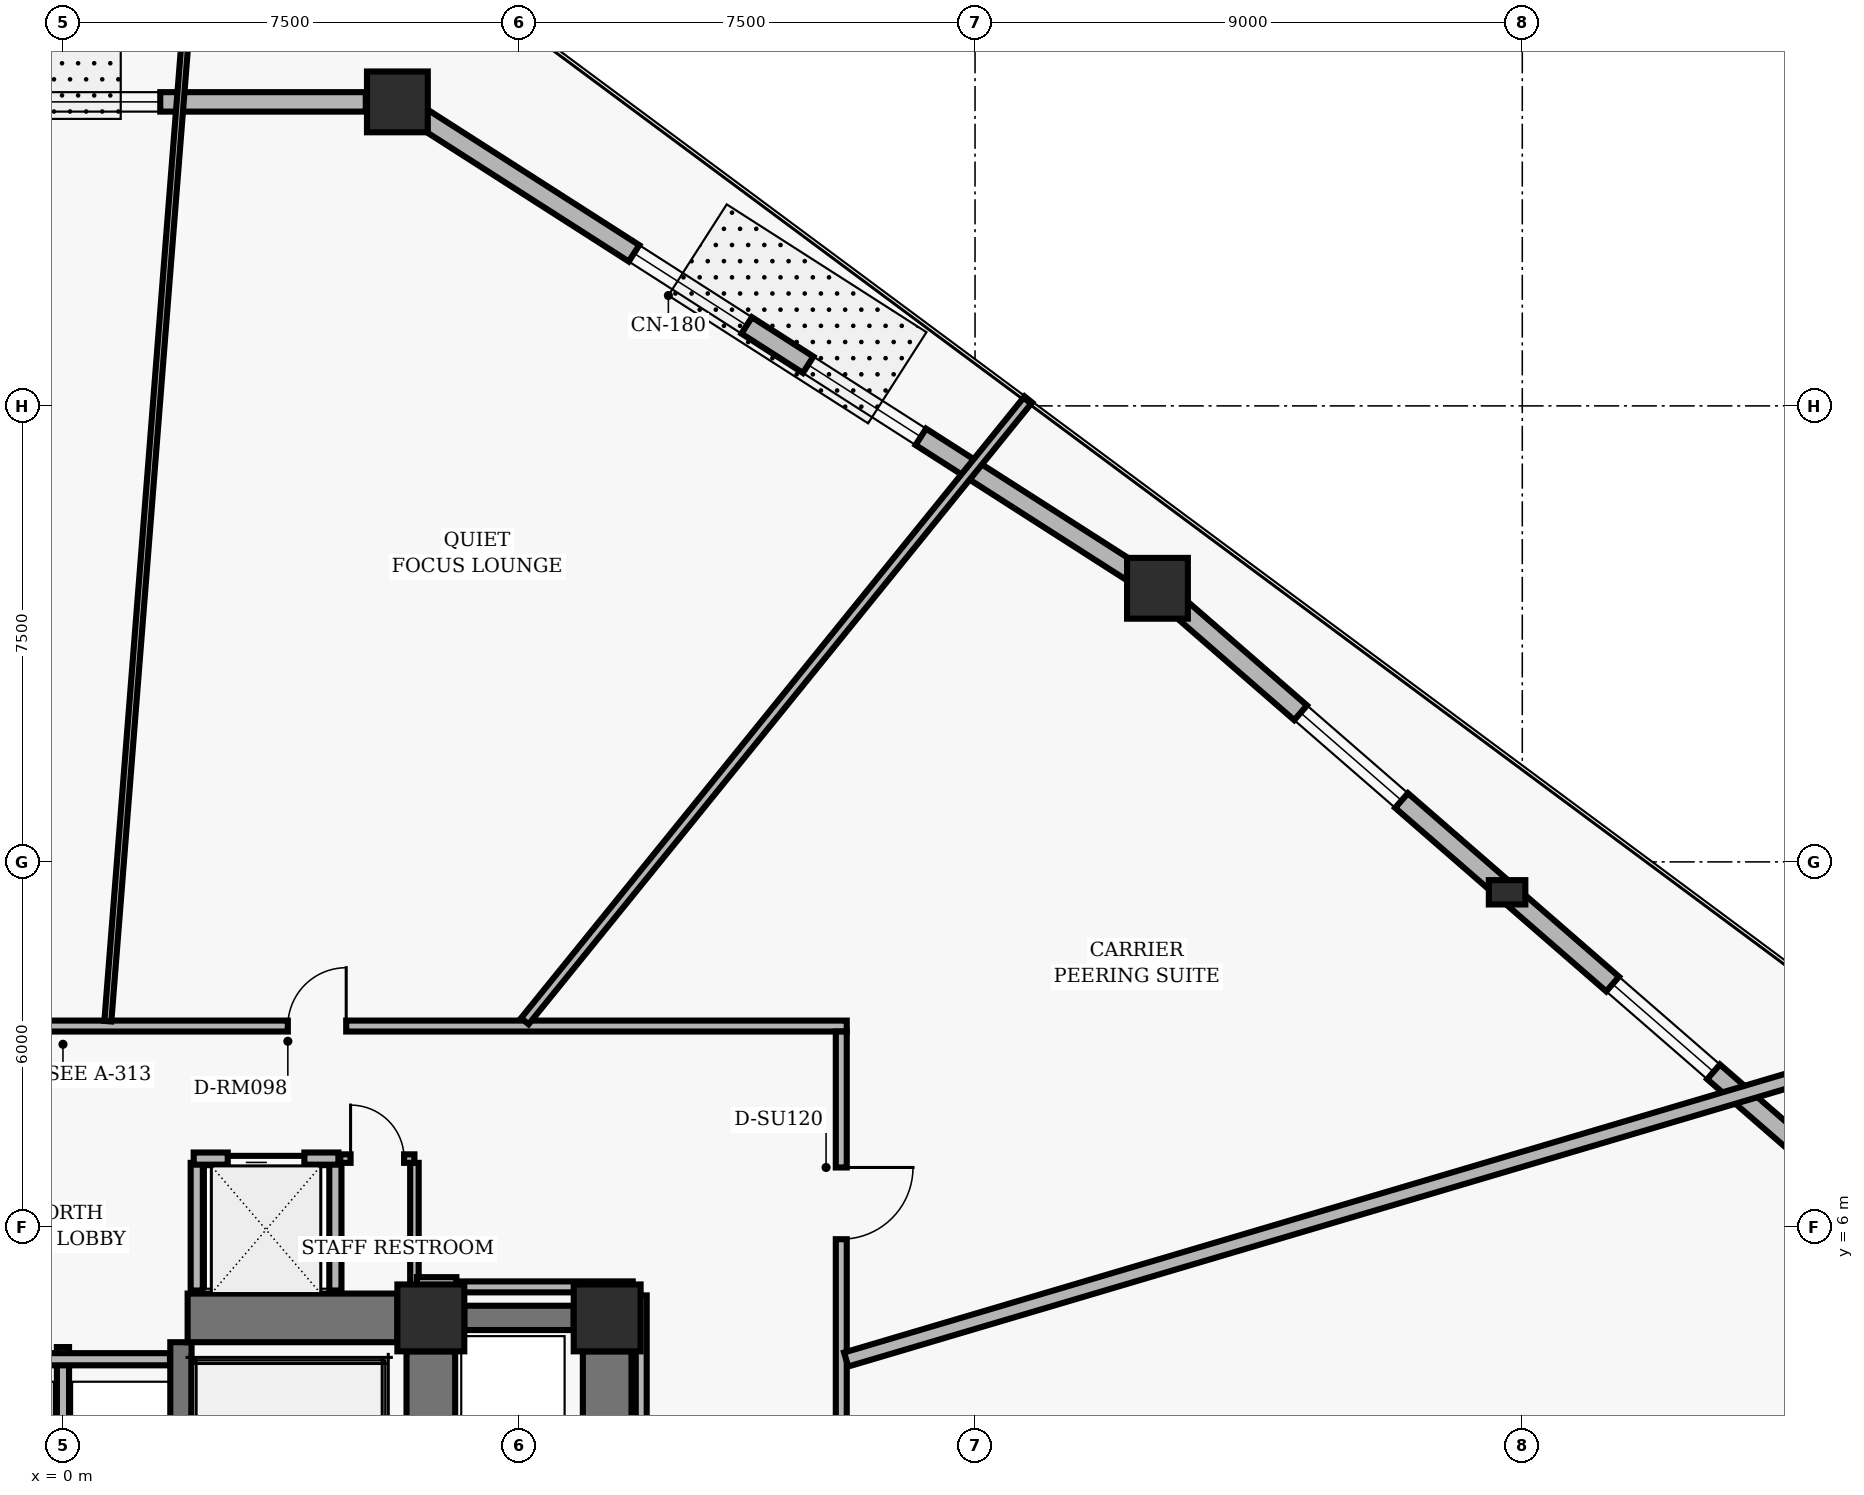
"""IFC4 building model, lengths in metres.
Left out: names, types, materials, properties, quantities, classifications, styles, units other than length and angle.
Written with IfcOpenShell. Run it as: python <this file> out.ifc"""

import sys

from ifc_helpers import new_model, si_unit, direction, frame, frame_2d, origin, origin_2d, place, context, subcontext, project, spatial, rectangle, hollow_rectangle, extrude, element, fill, save


model = new_model("IFC4")
c1 = context("Model", 3, precision=1e-05, world=origin(), true_north=direction((0.0, 1.0)))
c2 = subcontext(c1, "Body", "Model", "MODEL_VIEW")
j1 = project(units=[si_unit("LENGTHUNIT", "METRE"), si_unit("PLANEANGLEUNIT", "RADIAN")], contexts=[c1])
p1 = place(None, origin())
s1 = spatial("IfcSite", under=j1, at=p1, CompositionType="ELEMENT")
p2 = place(p1, origin())
s2 = spatial("IfcBuilding", under=s1, at=p2, CompositionType="ELEMENT")
p3 = place(p2, frame((0.0, 0.0, 4.8)))
s3 = spatial("IfcBuildingStorey", under=s2, at=p3, CompositionType="ELEMENT", Elevation=4.8)
for number, where, z_axis, x_axis in (
    (1, (6.05, 4.5, 0.0), (0.0, 0.0, 1.0), (1.0, 0.0, 0.0)),
    (2, (8.95, 4.5, 0.0), (0.0, 0.0, 1.0), (1.0, 0.0, 0.0)),
):
    element("IfcColumn", number, at=place(p3, frame(where, z_axis=z_axis, x_axis=x_axis)), inside=s3, PredefinedType="COLUMN", context=c2, shape_type="SweptSolid", body=[
        extrude(hollow_rectangle(XDim=1.1, YDim=1.1, WallThickness=0.07, InnerFilletRadius=0.02, OuterFilletRadius=0.04, at=origin_2d()), origin(), (0.0, 0.0, 1.0), 3.52),
    ])
p4 = place(p3, frame((6.05, 0.55, 0.0), z_axis=(0.0, 0.0, 1.0), x_axis=(0.0, 1.0, 0.0)))
e3 = element("IfcWall", 3, at=p4, inside=s3, PredefinedType="SHEAR", context=c2, shape_type="SweptSolid", body=[
    extrude(rectangle(XDim=3.4, YDim=0.8, at=frame_2d((1.7, 0.0))), origin(), (0.0, 0.0, 1.0), 3.218),
])
p5 = place(p3, frame((1.94, -4.1, 0.0), z_axis=(0.0, 0.0, 1.0), x_axis=(0.0, 1.0, 0.0)))
e4 = element("IfcWall", 4, at=p5, inside=s3, PredefinedType="SHEAR", context=c2, shape_type="SweptSolid", body=[
    extrude(rectangle(XDim=8.2, YDim=0.35, at=frame_2d((4.1, 0.0))), origin(), (0.0, 0.0, 1.0), 3.218),
])
p6 = place(p3, frame((2.05, 4.5, 0.0), z_axis=(0.0, 0.0, 1.0), x_axis=(1.0, 0.0, 0.0)))
e5 = element("IfcWall", 5, at=p6, inside=s3, PredefinedType="SHEAR", context=c2, shape_type="SweptSolid", body=[
    extrude(rectangle(XDim=3.45, YDim=0.8, at=frame_2d((1.725, 0.0))), origin(), (0.0, 0.0, 1.0), 3.218),
])
p7 = place(p3, frame((8.95, -3.75, 0.0), z_axis=(0.0, 0.0, 1.0), x_axis=(0.0, 1.0, 0.0)))
e6 = element("IfcWall", 6, at=p7, inside=s3, PredefinedType="SHEAR", context=c2, shape_type="SweptSolid", body=[
    extrude(rectangle(XDim=7.7, YDim=0.8, at=frame_2d((3.85, 0.0))), origin(), (0.0, 0.0, 1.0), 3.218),
])
p8 = place(p3, frame((6.6, 4.5, 0.0), z_axis=(0.0, 0.0, 1.0), x_axis=(1.0, 0.0, 0.0)))
e7 = element("IfcWall", 7, at=p8, inside=s3, PredefinedType="SHEAR", context=c2, shape_type="SweptSolid", body=[
    extrude(rectangle(XDim=1.8, YDim=0.4, at=frame_2d((0.9, 0.0))), origin(), (0.0, 0.0, 1.0), 3.218),
])
for number, where, z_axis, x_axis in (
    (8, (18.0, 16.5, 0.0), (0.0, 0.0, 1.0), (1.0, 0.0, 0.0)),
    (9, (5.5, 24.5, 0.0), (0.0, 0.0, 1.0), (1.0, 0.0, 0.0)),
):
    element("IfcColumn", number, at=place(p3, frame(where, z_axis=z_axis, x_axis=x_axis)), inside=s3, PredefinedType="COLUMN", context=c2, shape_type="SweptSolid", body=[
        extrude(rectangle(XDim=1.0, YDim=1.0, at=origin_2d()), origin(), (0.0, 0.0, 1.0), 3.52),
    ])
p9 = place(p3, frame((23.75, 11.5, 0.0), z_axis=(0.0, 0.0, 1.0), x_axis=(1.0, 0.0, 0.0)))
e10 = element("IfcColumn", 10, at=p9, inside=s3, PredefinedType="PILASTER", context=c2, shape_type="SweptSolid", body=[
    extrude(rectangle(XDim=0.6, YDim=0.4, at=origin_2d()), origin(), (0.0, 0.0, 1.0), 3.52),
])
p10 = place(p3, frame((18.392, 16.159, 0.0), z_axis=(0.0, 0.0, 1.0), x_axis=(0.754615886195, -0.656166796098, 0.0)))
e11 = element("IfcWall", 11, at=p10, inside=s3, PredefinedType="SOLIDWALL", context=c2, shape_type="SweptSolid", body=[
    extrude(rectangle(XDim=14.2, YDim=0.32, at=frame_2d((7.1, 0.0))), origin(), (0.0, 0.0, 1.0), 2.261),
])
p11 = place(p10, frame((2.6, 0.0, 0.4)))
e12 = element("IfcOpeningElement", 12, at=p11, cuts=e11, PredefinedType="OPENING", context=c2, shape_type="SweptSolid", body=[
    extrude(rectangle(XDim=2.2, YDim=1.1, at=frame_2d((1.1, 0.55))), frame((0.0, 0.17, 0.0), z_axis=(0.0, -1.0, 0.0), x_axis=(1.0, 0.0, 0.0)), (0.0, 0.0, 1.0), 0.34),
])
p12 = place(p10, frame((9.4, 0.0, 0.4)))
e13 = element("IfcOpeningElement", 13, at=p12, cuts=e11, PredefinedType="OPENING", context=c2, shape_type="SweptSolid", body=[
    extrude(rectangle(XDim=2.2, YDim=1.1, at=frame_2d((1.1, 0.55))), frame((0.0, 0.17, 0.0), z_axis=(0.0, -1.0, 0.0), x_axis=(1.0, 0.0, 0.0)), (0.0, 0.0, 1.0), 0.34),
])
p13 = place(p3, frame((5.938, 24.22, 0.0), z_axis=(0.0, 0.0, 1.0), x_axis=(0.842268830443, -0.539057712368, 0.0)))
e14 = element("IfcWall", 14, at=p13, inside=s3, PredefinedType="SOLIDWALL", context=c2, shape_type="SweptSolid", body=[
    extrude(rectangle(XDim=13.801, YDim=0.32, at=frame_2d((6.9, 0.0))), origin(), (0.0, 0.0, 1.0), 2.588),
])
p14 = place(p13, frame((4.1, 0.0, 0.65)))
e15 = element("IfcOpeningElement", 15, at=p14, cuts=e14, PredefinedType="OPENING", context=c2, shape_type="SweptSolid", body=[
    extrude(rectangle(XDim=2.2, YDim=1.1, at=frame_2d((1.1, 0.55))), frame((0.0, 0.17, 0.0), z_axis=(0.0, -1.0, 0.0), x_axis=(1.0, 0.0, 0.0)), (0.0, 0.0, 1.0), 0.34),
])
p15 = place(p13, frame((7.5, 0.0, 0.65)))
e16 = element("IfcOpeningElement", 16, at=p15, cuts=e14, PredefinedType="OPENING", context=c2, shape_type="SweptSolid", body=[
    extrude(rectangle(XDim=2.2, YDim=1.1, at=frame_2d((1.1, 0.55))), frame((0.0, 0.17, 0.0), z_axis=(0.0, -1.0, 0.0), x_axis=(1.0, 0.0, 0.0)), (0.0, 0.0, 1.0), 0.34),
])
p16 = place(p3, frame((-6.98, 24.5, 0.0), z_axis=(0.0, 0.0, 1.0), x_axis=(1.0, 0.0, 0.0)))
e17 = element("IfcWall", 17, at=p16, inside=s3, PredefinedType="SOLIDWALL", context=c2, shape_type="SweptSolid", body=[
    extrude(rectangle(XDim=11.96, YDim=0.32, at=frame_2d((5.98, 0.0))), origin(), (0.0, 0.0, 1.0), 2.588),
])
p17 = place(p16, frame((3.38, 0.0, 0.65)))
e18 = element("IfcOpeningElement", 18, at=p17, cuts=e17, PredefinedType="OPENING", context=c2, shape_type="SweptSolid", body=[
    extrude(rectangle(XDim=2.0, YDim=1.6, at=frame_2d((1.0, 0.8))), frame((0.0, 0.17, 0.0), z_axis=(0.0, -1.0, 0.0), x_axis=(1.0, 0.0, 0.0)), (0.0, 0.0, 1.0), 0.34),
])
p18 = place(p16, frame((6.58, 0.0, 0.65)))
e19 = element("IfcOpeningElement", 19, at=p18, cuts=e17, PredefinedType="OPENING", context=c2, shape_type="SweptSolid", body=[
    extrude(rectangle(XDim=2.0, YDim=1.6, at=frame_2d((1.0, 0.8))), frame((0.0, 0.17, 0.0), z_axis=(0.0, -1.0, 0.0), x_axis=(1.0, 0.0, 0.0)), (0.0, 0.0, 1.0), 0.34),
])
p19 = place(p3, frame((0.0, 1.25, 0.0), z_axis=(0.0, 0.0, 1.0), x_axis=(0.0, 1.0, 0.0)))
e20 = element("IfcWall", 20, at=p19, inside=s3, PredefinedType="PARTITIONING", context=c2, shape_type="SweptSolid", body=[
    extrude(rectangle(XDim=2.77, YDim=0.2, at=frame_2d((1.385, 0.0))), origin(), (0.0, 0.0, 1.0), 3.193),
])
p20 = place(p3, frame((-1.76, 3.82, 0.0), z_axis=(0.0, 0.0, 1.0), x_axis=(1.0, 0.0, 0.0)))
e21 = element("IfcWall", 21, at=p20, inside=s3, PredefinedType="PARTITIONING", context=c2, shape_type="SweptSolid", body=[
    extrude(rectangle(XDim=3.52, YDim=0.2, at=frame_2d((1.76, 0.0))), origin(), (0.0, 0.0, 1.0), 3.193),
])
for number, where, z_axis, x_axis in (
    (22, (2.2, 4.95, 0.0), (0.0, 0.0, 1.0), (0.0, 1.0, 0.0)),
    (23, (4.48, 4.95, 0.0), (0.0, 0.0, 1.0), (0.0, 1.0, 0.0)),
):
    element("IfcWall", number, at=place(p3, frame(where, z_axis=z_axis, x_axis=x_axis)), inside=s3, PredefinedType="PARTITIONING", context=c2, shape_type="SweptSolid", body=[
        extrude(rectangle(XDim=2.1, YDim=0.2, at=frame_2d((1.05, 0.0))), origin(), (0.0, 0.0, 1.0), 3.193),
    ])
p21 = place(p3, frame((2.15, 7.12, 0.0), z_axis=(0.0, 0.0, 1.0), x_axis=(1.0, 0.0, 0.0)))
e24 = element("IfcWall", 24, at=p21, inside=s3, PredefinedType="PARTITIONING", context=c2, shape_type="SweptSolid", body=[
    extrude(rectangle(XDim=2.38, YDim=0.2, at=frame_2d((1.19, 0.0))), origin(), (0.0, 0.0, 1.0), 3.193),
])
p22 = place(p21, frame((0.56, 0.0, 0.0)))
e25 = element("IfcOpeningElement", 25, at=p22, cuts=e24, PredefinedType="OPENING", context=c2, shape_type="SweptSolid", body=[
    extrude(rectangle(XDim=1.26, YDim=2.06, at=frame_2d((0.63, 1.03))), frame((0.0, 0.11, 0.0), z_axis=(0.0, -1.0, 0.0), x_axis=(1.0, 0.0, 0.0)), (0.0, 0.0, 1.0), 0.22),
])
p23 = place(p3, frame((5.78, 4.95, 0.0), z_axis=(0.0, 0.0, 1.0), x_axis=(0.0, 1.0, 0.0)))
e26 = element("IfcWall", 26, at=p23, inside=s3, PredefinedType="PARTITIONING", context=c2, shape_type="SweptSolid", body=[
    extrude(rectangle(XDim=2.1, YDim=0.14, at=frame_2d((1.05, 0.0))), origin(), (0.0, 0.0, 1.0), 2.246),
])
p24 = place(p3, frame((4.56, 7.12, 0.0), z_axis=(0.0, 0.0, 1.0), x_axis=(1.0, 0.0, 0.0)))
e27 = element("IfcWall", 27, at=p24, inside=s3, PredefinedType="PARTITIONING", context=c2, shape_type="SweptSolid", body=[
    extrude(rectangle(XDim=1.22, YDim=0.14, at=frame_2d((0.61, 0.0))), origin(), (0.0, 0.0, 1.0), 3.193),
])
p25 = place(p24, frame((0.17, 0.0, 0.0)))
e28 = element("IfcOpeningElement", 28, at=p25, cuts=e27, PredefinedType="OPENING", context=c2, shape_type="SweptSolid", body=[
    extrude(rectangle(XDim=0.88, YDim=2.02, at=frame_2d((0.44, 1.01))), frame((0.0, 0.08, 0.0), z_axis=(0.0, -1.0, 0.0), x_axis=(1.0, 0.0, 0.0)), (0.0, 0.0, 1.0), 0.16),
])
p26 = place(p3, frame((-12.89, 9.3, 0.0), z_axis=(0.0, 0.0, 1.0), x_axis=(1.0, 0.0, 0.0)))
e29 = element("IfcWall", 29, at=p26, inside=s3, PredefinedType="PARTITIONING", context=c2, shape_type="SweptSolid", body=[
    extrude(rectangle(XDim=25.78, YDim=0.18, at=frame_2d((12.89, 0.0))), origin(), (0.0, 0.0, 1.0), 2.76),
])
p27 = place(p26, frame((16.588, 0.0, 0.0)))
e30 = element("IfcOpeningElement", 30, at=p27, cuts=e29, PredefinedType="OPENING", context=c2, shape_type="SweptSolid", body=[
    extrude(rectangle(XDim=0.96, YDim=2.02, at=frame_2d((0.48, 1.01))), frame((0.0, 0.1, 0.0), z_axis=(0.0, -1.0, 0.0), x_axis=(1.0, 0.0, 0.0)), (0.0, 0.0, 1.0), 0.2),
])
p28 = place(p26, frame((9.618, 0.0, 0.0)))
e31 = element("IfcOpeningElement", 31, at=p28, cuts=e29, PredefinedType="OPENING", context=c2, shape_type="SweptSolid", body=[
    extrude(rectangle(XDim=1.18, YDim=2.02, at=frame_2d((0.59, 1.01))), frame((0.0, 0.1, 0.0), z_axis=(0.0, -1.0, 0.0), x_axis=(1.0, 0.0, 0.0)), (0.0, 0.0, 1.0), 0.2),
])
p29 = place(p26, frame((2.932, 0.0, 0.0)))
e32 = element("IfcOpeningElement", 32, at=p29, cuts=e29, PredefinedType="OPENING", context=c2, shape_type="SweptSolid", body=[
    extrude(rectangle(XDim=1.18, YDim=2.02, at=frame_2d((0.59, 1.01))), frame((0.0, 0.1, 0.0), z_axis=(0.0, -1.0, 0.0), x_axis=(1.0, 0.0, 0.0)), (0.0, 0.0, 1.0), 0.2),
])
p30 = place(p3, frame((12.8, 9.21, 0.0), z_axis=(0.0, 0.0, 1.0), x_axis=(0.0, -1.0, 0.0)))
e33 = element("IfcWall", 33, at=p30, inside=s3, PredefinedType="PARTITIONING", context=c2, shape_type="SweptSolid", body=[
    extrude(rectangle(XDim=7.62, YDim=0.18, at=frame_2d((3.81, 0.0))), origin(), (0.0, 0.0, 1.0), 3.193),
])
p31 = place(p30, frame((2.236, 0.0, 0.0)))
e34 = element("IfcOpeningElement", 34, at=p31, cuts=e33, PredefinedType="OPENING", context=c2, shape_type="SweptSolid", body=[
    extrude(rectangle(XDim=1.18, YDim=2.02, at=frame_2d((0.59, 1.01))), frame((0.0, 0.1, 0.0), z_axis=(0.0, -1.0, 0.0), x_axis=(1.0, 0.0, 0.0)), (0.0, 0.0, 1.0), 0.2),
])
p32 = place(p3, frame((9.51, -4.87, 0.0), z_axis=(0.0, 0.0, 1.0), x_axis=(0.0, 1.0, 0.0)))
e35 = element("IfcWall", 35, at=p32, inside=s3, PredefinedType="PARTITIONING", context=c2, shape_type="SweptSolid", body=[
    extrude(rectangle(XDim=9.74, YDim=0.18, at=frame_2d((4.87, 0.0))), origin(), (0.0, 0.0, 1.0), 3.193),
])
p33 = place(p3, frame((9.37, 5.01, 0.0), z_axis=(0.0, 0.0, 1.0), x_axis=(-1.0, 0.0, 0.0)))
e36 = element("IfcWall", 36, at=p33, inside=s3, PredefinedType="PARTITIONING", context=c2, shape_type="SweptSolid", body=[
    extrude(rectangle(XDim=2.808, YDim=0.18, at=frame_2d((1.404, 0.0))), origin(), (0.0, 0.0, 1.0), 3.193),
])
p34 = place(p3, frame((6.47, 5.08, 0.0), z_axis=(0.0, 0.0, 1.0), x_axis=(-1.0, 0.0, 0.0)))
e37 = element("IfcWall", 37, at=p34, inside=s3, PredefinedType="PARTITIONING", context=c2, shape_type="SweptSolid", body=[
    extrude(rectangle(XDim=0.65, YDim=0.18, at=frame_2d((0.325, 0.0))), origin(), (0.0, 0.0, 1.0), 3.193),
])
p35 = place(p3, frame((12.88, 3.815, 0.0), z_axis=(0.0, 0.0, 1.0), x_axis=(0.958821118113, 0.284010674906, 0.0)))
e38 = element("IfcWall", 38, at=p35, inside=s3, PredefinedType="PARTITIONING", context=c2, shape_type="SweptSolid", body=[
    extrude(rectangle(XDim=18.091, YDim=0.24, at=frame_2d((9.045, 0.0))), origin(), (0.0, 0.0, 1.0), 2.246),
])
p36 = place(p3, frame((7.596, 9.38, 0.0), z_axis=(0.0, 0.0, 1.0), x_axis=(0.62932258483, 0.777144184964, 0.0)))
e39 = element("IfcWall", 39, at=p36, inside=s3, PredefinedType="PARTITIONING", context=c2, shape_type="SweptSolid", body=[
    extrude(rectangle(XDim=13.158, YDim=0.16, at=frame_2d((6.579, 0.0))), origin(), (0.0, 0.0, 1.0), 3.193),
])
p37 = place(p3, frame((0.738, 9.38, 0.0), z_axis=(0.0, 0.0, 1.0), x_axis=(0.078449467475, 0.996918091446, 0.0)))
e40 = element("IfcWall", 40, at=p37, inside=s3, PredefinedType="MOVABLE", context=c2, shape_type="SweptSolid", body=[
    extrude(rectangle(XDim=17.614, YDim=0.115, at=frame_2d((8.807, 0.0))), origin(), (0.0, 0.0, 1.0), 3.193),
])
p38 = place(p11, origin())
e41 = element("IfcWindow", 41, at=p38, inside=s3, PartitioningType="SINGLE_PANEL", PredefinedType="WINDOW", context=c2, shape_type="SweptSolid", body=[
    extrude(rectangle(XDim=2.2, YDim=1.1, at=frame_2d((1.1, 0.55))), frame((0.0, 0.03, 0.0), z_axis=(0.0, -1.0, 0.0), x_axis=(1.0, 0.0, 0.0)), (0.0, 0.0, 1.0), 0.06),
])
fill(e12, e41)
p39 = place(p12, origin())
e42 = element("IfcWindow", 42, at=p39, inside=s3, PartitioningType="SINGLE_PANEL", PredefinedType="WINDOW", context=c2, shape_type="SweptSolid", body=[
    extrude(rectangle(XDim=2.2, YDim=1.1, at=frame_2d((1.1, 0.55))), frame((0.0, 0.03, 0.0), z_axis=(0.0, -1.0, 0.0), x_axis=(1.0, 0.0, 0.0)), (0.0, 0.0, 1.0), 0.06),
])
fill(e13, e42)
p40 = place(p14, origin())
e43 = element("IfcWindow", 43, at=p40, inside=s3, PartitioningType="SINGLE_PANEL", PredefinedType="WINDOW", context=c2, shape_type="SweptSolid", body=[
    extrude(rectangle(XDim=2.2, YDim=1.1, at=frame_2d((1.1, 0.55))), frame((0.0, 0.03, 0.0), z_axis=(0.0, -1.0, 0.0), x_axis=(1.0, 0.0, 0.0)), (0.0, 0.0, 1.0), 0.06),
])
fill(e15, e43)
p41 = place(p15, origin())
e44 = element("IfcWindow", 44, at=p41, inside=s3, PartitioningType="SINGLE_PANEL", PredefinedType="WINDOW", context=c2, shape_type="SweptSolid", body=[
    extrude(rectangle(XDim=2.2, YDim=1.1, at=frame_2d((1.1, 0.55))), frame((0.0, 0.03, 0.0), z_axis=(0.0, -1.0, 0.0), x_axis=(1.0, 0.0, 0.0)), (0.0, 0.0, 1.0), 0.06),
])
fill(e16, e44)
p42 = place(p18, origin())
e45 = element("IfcWindow", 45, at=p42, inside=s3, PartitioningType="SINGLE_PANEL", PredefinedType="WINDOW", context=c2, shape_type="SweptSolid", body=[
    extrude(rectangle(XDim=2.0, YDim=1.6, at=frame_2d((1.0, 0.8))), frame((0.0, 0.03, 0.0), z_axis=(0.0, -1.0, 0.0), x_axis=(1.0, 0.0, 0.0)), (0.0, 0.0, 1.0), 0.06),
])
fill(e19, e45)
p43 = place(p22, origin())
e46 = element("IfcDoor", 46, at=p43, inside=s3, OperationType="SLIDING_TO_LEFT", PredefinedType="DOOR", context=c2, shape_type="SweptSolid", body=[
    extrude(rectangle(XDim=1.26, YDim=2.06, at=frame_2d((0.63, 1.03))), frame((0.0, 0.025, 0.0), z_axis=(0.0, -1.0, 0.0), x_axis=(1.0, 0.0, 0.0)), (0.0, 0.0, 1.0), 0.05),
])
fill(e25, e46)
p44 = place(p25, origin())
e47 = element("IfcDoor", 47, at=p44, inside=s3, OperationType="SINGLE_SWING_LEFT", PredefinedType="DOOR", context=c2, shape_type="SweptSolid", body=[
    extrude(rectangle(XDim=0.88, YDim=2.02, at=frame_2d((0.44, 1.01))), frame((0.0, 0.025, 0.0), z_axis=(0.0, -1.0, 0.0), x_axis=(1.0, 0.0, 0.0)), (0.0, 0.0, 1.0), 0.05),
])
fill(e28, e47)
p45 = place(p31, origin())
e48 = element("IfcDoor", 48, at=p45, inside=s3, OperationType="SINGLE_SWING_LEFT", PredefinedType="DOOR", context=c2, shape_type="SweptSolid", body=[
    extrude(rectangle(XDim=1.18, YDim=2.02, at=frame_2d((0.59, 1.01))), frame((0.0, 0.025, 0.0), z_axis=(0.0, -1.0, 0.0), x_axis=(1.0, 0.0, 0.0)), (0.0, 0.0, 1.0), 0.05),
])
fill(e34, e48)
p46 = place(p27, origin())
e49 = element("IfcDoor", 49, at=p46, inside=s3, OperationType="SINGLE_SWING_RIGHT", PredefinedType="DOOR", context=c2, shape_type="SweptSolid", body=[
    extrude(rectangle(XDim=0.96, YDim=2.02, at=frame_2d((0.48, 1.01))), frame((0.0, 0.025, 0.0), z_axis=(0.0, -1.0, 0.0), x_axis=(1.0, 0.0, 0.0)), (0.0, 0.0, 1.0), 0.05),
])
fill(e30, e49)
save(model, sys.argv[1])
